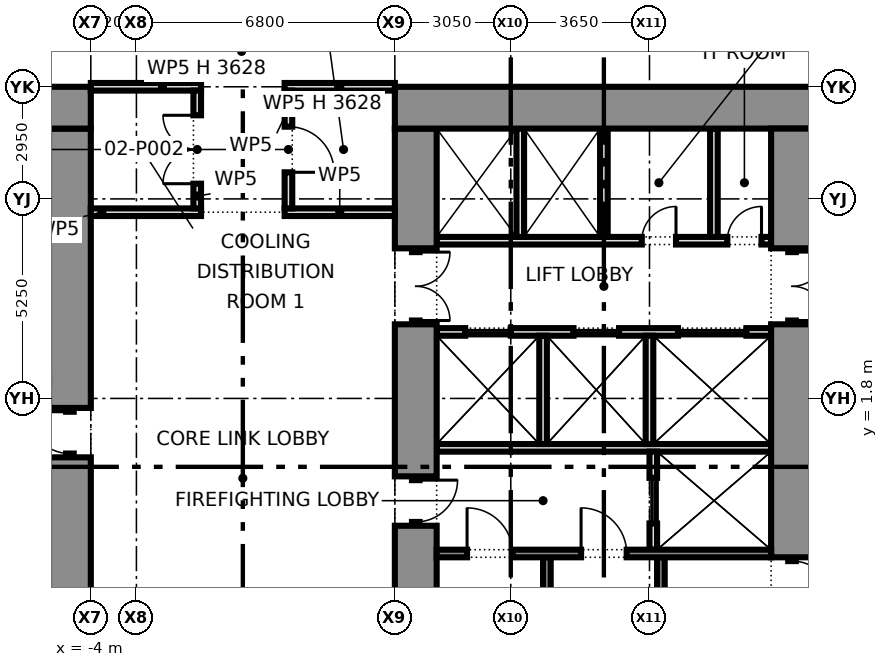
"""IFC4 building model, lengths in metres.
Left out: names, types, materials, properties, quantities, classifications, styles, units other than length and angle.
Written with IfcOpenShell. Run it as: python <this file> out.ifc"""

import sys

from ifc_helpers import new_model, si_unit, direction, frame, frame_2d, origin, place, context, subcontext, project, spatial, rectangle, extrude, element, fill, save


model = new_model("IFC4")
c1 = context("Model", 3, precision=1e-05, world=origin(), true_north=direction((0.0, 1.0)))
c2 = subcontext(c1, "Body", "Model", "MODEL_VIEW")
j1 = project(units=[si_unit("LENGTHUNIT", "METRE"), si_unit("PLANEANGLEUNIT", "RADIAN")], contexts=[c1])
p1 = place(None, origin())
s1 = spatial("IfcSite", under=j1, at=p1, CompositionType="ELEMENT")
p2 = place(p1, origin())
s2 = spatial("IfcBuilding", under=s1, at=p2, CompositionType="ELEMENT")
p3 = place(p2, frame((0.0, 0.0, 6.5)))
s3 = spatial("IfcBuildingStorey", under=s2, at=p3, CompositionType="ELEMENT", Elevation=6.5)
p4 = place(p3, frame((-15.0, 9.45, 0.0), z_axis=(0.0, 0.0, 1.0), x_axis=(1.0, 0.0, 0.0)))
e1 = element("IfcWall", 1, at=p4, inside=s3, PredefinedType="SHEAR", context=c2, shape_type="SweptSolid", body=[
    extrude(rectangle(XDim=11.0, YDim=1.1, at=frame_2d((5.5, 0.0))), origin(), (0.0, 0.0, 1.0), 4.575),
])
p5 = place(p3, frame((-4.55, -3.75, 0.0), z_axis=(0.0, 0.0, 1.0), x_axis=(0.0, 1.0, 0.0)))
e2 = element("IfcWall", 2, at=p5, inside=s3, PredefinedType="SHEAR", context=c2, shape_type="SweptSolid", body=[
    extrude(rectangle(XDim=4.0, YDim=1.1, at=frame_2d((2.0, 0.0))), origin(), (0.0, 0.0, 1.0), 4.575),
])
p6 = place(p3, frame((-4.55, 0.25, 0.0), z_axis=(0.0, 0.0, 1.0), x_axis=(0.0, 1.0, 0.0)))
e3 = element("IfcWall", 3, at=p6, inside=s3, PredefinedType="PARTITIONING", context=c2, shape_type="SweptSolid", body=[
    extrude(rectangle(XDim=1.3, YDim=0.2, at=frame_2d((0.65, 0.0))), origin(), (0.0, 0.0, 1.0), 2.4),
])
p7 = place(p6, frame((0.1, 0.0, 0.0)))
e4 = element("IfcOpeningElement", 4, at=p7, cuts=e3, PredefinedType="OPENING", context=c2, shape_type="SweptSolid", body=[
    extrude(rectangle(XDim=1.1, YDim=2.1, at=frame_2d((0.55, 1.05))), frame((0.0, 0.11, 0.0), z_axis=(0.0, -1.0, 0.0), x_axis=(1.0, 0.0, 0.0)), (0.0, 0.0, 1.0), 0.22),
])
p8 = place(p3, frame((-4.55, 1.55, 0.0), z_axis=(0.0, 0.0, 1.0), x_axis=(0.0, 1.0, 0.0)))
e5 = element("IfcWall", 5, at=p8, inside=s3, PredefinedType="SHEAR", context=c2, shape_type="SweptSolid", body=[
    extrude(rectangle(XDim=7.35, YDim=1.1, at=frame_2d((3.675, 0.0))), origin(), (0.0, 0.0, 1.0), 4.575),
])
p9 = place(p3, frame((15.0, 9.45, 0.0), z_axis=(0.0, 0.0, 1.0), x_axis=(-1.0, 0.0, 0.0)))
e6 = element("IfcWall", 6, at=p9, inside=s3, PredefinedType="SHEAR", context=c2, shape_type="SweptSolid", body=[
    extrude(rectangle(XDim=11.0, YDim=1.1, at=frame_2d((5.5, 0.0))), origin(), (0.0, 0.0, 1.0), 4.575),
])
p10 = place(p3, frame((14.45, 8.9, 0.0), z_axis=(0.0, 0.0, 1.0), x_axis=(0.0, -1.0, 0.0)))
e7 = element("IfcWall", 7, at=p10, inside=s3, PredefinedType="SHEAR", context=c2, shape_type="SweptSolid", body=[
    extrude(rectangle(XDim=3.15, YDim=1.1, at=frame_2d((1.575, 0.0))), origin(), (0.0, 0.0, 1.0), 4.575),
])
p11 = place(p3, frame((14.45, 5.75, 0.0), z_axis=(0.0, 0.0, 1.0), x_axis=(0.0, -1.0, 0.0)))
e8 = element("IfcWall", 8, at=p11, inside=s3, PredefinedType="PARTITIONING", context=c2, shape_type="SweptSolid", body=[
    extrude(rectangle(XDim=2.0, YDim=0.2, at=frame_2d((1.0, 0.0))), origin(), (0.0, 0.0, 1.0), 2.4),
])
p12 = place(p11, frame((0.1, 0.0, 0.0)))
e9 = element("IfcOpeningElement", 9, at=p12, cuts=e8, PredefinedType="OPENING", context=c2, shape_type="SweptSolid", body=[
    extrude(rectangle(XDim=1.8, YDim=2.1, at=frame_2d((0.9, 1.05))), frame((0.0, 0.11, 0.0), z_axis=(0.0, -1.0, 0.0), x_axis=(1.0, 0.0, 0.0)), (0.0, 0.0, 1.0), 0.22),
])
p13 = place(p3, frame((14.45, 3.75, 0.0), z_axis=(0.0, 0.0, 1.0), x_axis=(0.0, -1.0, 0.0)))
e10 = element("IfcWall", 10, at=p13, inside=s3, PredefinedType="SHEAR", context=c2, shape_type="SweptSolid", body=[
    extrude(rectangle(XDim=6.13, YDim=1.1, at=frame_2d((3.065, 0.0))), origin(), (0.0, 0.0, 1.0), 4.575),
])
p14 = place(p3, frame((14.45, -2.38, 0.0), z_axis=(0.0, 0.0, 1.0), x_axis=(0.0, -1.0, 0.0)))
e11 = element("IfcWall", 11, at=p14, inside=s3, PredefinedType="SHEAR", context=c2, shape_type="SweptSolid", body=[
    extrude(rectangle(XDim=1.3, YDim=0.2, at=frame_2d((0.65, 0.0))), origin(), (0.0, 0.0, 1.0), 2.4),
])
p15 = place(p14, frame((0.1, 0.0, 0.0)))
e12 = element("IfcOpeningElement", 12, at=p15, cuts=e11, PredefinedType="OPENING", context=c2, shape_type="SweptSolid", body=[
    extrude(rectangle(XDim=1.1, YDim=2.1, at=frame_2d((0.55, 1.05))), frame((0.0, 0.11, 0.0), z_axis=(0.0, -1.0, 0.0), x_axis=(1.0, 0.0, 0.0)), (0.0, 0.0, 1.0), 0.22),
])
p16 = place(p3, frame((4.55, 8.9, 0.0), z_axis=(0.0, 0.0, 1.0), x_axis=(0.0, -1.0, 0.0)))
e13 = element("IfcWall", 13, at=p16, inside=s3, PredefinedType="SHEAR", context=c2, shape_type="SweptSolid", body=[
    extrude(rectangle(XDim=3.15, YDim=1.1, at=frame_2d((1.575, 0.0))), origin(), (0.0, 0.0, 1.0), 4.575),
])
p17 = place(p3, frame((4.55, 5.75, 0.0), z_axis=(0.0, 0.0, 1.0), x_axis=(0.0, -1.0, 0.0)))
e14 = element("IfcWall", 14, at=p17, inside=s3, PredefinedType="PARTITIONING", context=c2, shape_type="SweptSolid", body=[
    extrude(rectangle(XDim=2.0, YDim=0.2, at=frame_2d((1.0, 0.0))), origin(), (0.0, 0.0, 1.0), 2.4),
])
p18 = place(p17, frame((0.1, 0.0, 0.0)))
e15 = element("IfcOpeningElement", 15, at=p18, cuts=e14, PredefinedType="OPENING", context=c2, shape_type="SweptSolid", body=[
    extrude(rectangle(XDim=1.8, YDim=2.1, at=frame_2d((0.9, 1.05))), frame((0.0, 0.11, 0.0), z_axis=(0.0, -1.0, 0.0), x_axis=(1.0, 0.0, 0.0)), (0.0, 0.0, 1.0), 0.22),
])
p19 = place(p3, frame((4.55, 3.75, 0.0), z_axis=(0.0, 0.0, 1.0), x_axis=(0.0, -1.0, 0.0)))
e16 = element("IfcWall", 16, at=p19, inside=s3, PredefinedType="SHEAR", context=c2, shape_type="SweptSolid", body=[
    extrude(rectangle(XDim=4.0, YDim=1.1, at=frame_2d((2.0, 0.0))), origin(), (0.0, 0.0, 1.0), 4.575),
])
p20 = place(p3, frame((4.55, -0.25, 0.0), z_axis=(0.0, 0.0, 1.0), x_axis=(0.0, -1.0, 0.0)))
e17 = element("IfcWall", 17, at=p20, inside=s3, PredefinedType="PARTITIONING", context=c2, shape_type="SweptSolid", body=[
    extrude(rectangle(XDim=1.3, YDim=0.2, at=frame_2d((0.65, 0.0))), origin(), (0.0, 0.0, 1.0), 2.4),
])
p21 = place(p20, frame((0.1, 0.0, 0.0)))
e18 = element("IfcOpeningElement", 18, at=p21, cuts=e17, PredefinedType="OPENING", context=c2, shape_type="SweptSolid", body=[
    extrude(rectangle(XDim=1.1, YDim=2.1, at=frame_2d((0.55, 1.05))), frame((0.0, 0.11, 0.0), z_axis=(0.0, -1.0, 0.0), x_axis=(1.0, 0.0, 0.0)), (0.0, 0.0, 1.0), 0.22),
])
p22 = place(p3, frame((4.55, -1.55, 0.0), z_axis=(0.0, 0.0, 1.0), x_axis=(0.0, -1.0, 0.0)))
e19 = element("IfcWall", 19, at=p22, inside=s3, PredefinedType="SHEAR", context=c2, shape_type="SweptSolid", body=[
    extrude(rectangle(XDim=7.35, YDim=1.1, at=frame_2d((3.675, 0.0))), origin(), (0.0, 0.0, 1.0), 4.575),
])
p23 = place(p3, frame((13.9, 5.95, 0.0), z_axis=(0.0, 0.0, 1.0), x_axis=(-1.0, 0.0, 0.0)))
e20 = element("IfcWall", 20, at=p23, inside=s3, PredefinedType="PARTITIONING", context=c2, shape_type="SweptSolid", body=[
    extrude(rectangle(XDim=8.8, YDim=0.2, at=frame_2d((4.4, 0.0))), origin(), (0.0, 0.0, 1.0), 4.575),
])
p24 = place(p23, frame((0.252, 0.0, 0.0)))
e21 = element("IfcOpeningElement", 21, at=p24, cuts=e20, PredefinedType="OPENING", context=c2, shape_type="SweptSolid", body=[
    extrude(rectangle(XDim=0.9, YDim=2.1, at=frame_2d((0.45, 1.05))), frame((0.0, 0.11, 0.0), z_axis=(0.0, -1.0, 0.0), x_axis=(1.0, 0.0, 0.0)), (0.0, 0.0, 1.0), 0.22),
])
p25 = place(p23, frame((2.502, 0.0, 0.0)))
e22 = element("IfcOpeningElement", 22, at=p25, cuts=e20, PredefinedType="OPENING", context=c2, shape_type="SweptSolid", body=[
    extrude(rectangle(XDim=0.9, YDim=2.1, at=frame_2d((0.45, 1.05))), frame((0.0, 0.11, 0.0), z_axis=(0.0, -1.0, 0.0), x_axis=(1.0, 0.0, 0.0)), (0.0, 0.0, 1.0), 0.22),
])
p26 = place(p3, frame((13.9, 3.55, 0.0), z_axis=(0.0, 0.0, 1.0), x_axis=(-1.0, 0.0, 0.0)))
e23 = element("IfcWall", 23, at=p26, inside=s3, PredefinedType="PARTITIONING", context=c2, shape_type="SweptSolid", body=[
    extrude(rectangle(XDim=8.8, YDim=0.2, at=frame_2d((4.4, 0.0))), origin(), (0.0, 0.0, 1.0), 4.575),
])
p27 = place(p26, frame((0.65, 0.0, 0.0)))
e24 = element("IfcOpeningElement", 24, at=p27, cuts=e23, PredefinedType="OPENING", context=c2, shape_type="SweptSolid", body=[
    extrude(rectangle(XDim=1.8, YDim=2.1, at=frame_2d((0.9, 1.05))), frame((0.0, 0.11, 0.0), z_axis=(0.0, -1.0, 0.0), x_axis=(1.0, 0.0, 0.0)), (0.0, 0.0, 1.0), 0.22),
])
p28 = place(p26, frame((4.0, 0.0, 0.0)))
e25 = element("IfcOpeningElement", 25, at=p28, cuts=e23, PredefinedType="OPENING", context=c2, shape_type="SweptSolid", body=[
    extrude(rectangle(XDim=1.2, YDim=2.1, at=frame_2d((0.6, 1.05))), frame((0.0, 0.11, 0.0), z_axis=(0.0, -1.0, 0.0), x_axis=(1.0, 0.0, 0.0)), (0.0, 0.0, 1.0), 0.22),
])
p29 = place(p26, frame((6.85, 0.0, 0.0)))
e26 = element("IfcOpeningElement", 26, at=p29, cuts=e23, PredefinedType="OPENING", context=c2, shape_type="SweptSolid", body=[
    extrude(rectangle(XDim=1.2, YDim=2.1, at=frame_2d((0.6, 1.05))), frame((0.0, 0.11, 0.0), z_axis=(0.0, -1.0, 0.0), x_axis=(1.0, 0.0, 0.0)), (0.0, 0.0, 1.0), 0.22),
])
p30 = place(p3, frame((13.9, 0.5, 0.0), z_axis=(0.0, 0.0, 1.0), x_axis=(-1.0, 0.0, 0.0)))
e27 = element("IfcWall", 27, at=p30, inside=s3, PredefinedType="PARTITIONING", context=c2, shape_type="SweptSolid", body=[
    extrude(rectangle(XDim=8.8, YDim=0.2, at=frame_2d((4.4, 0.0))), origin(), (0.0, 0.0, 1.0), 4.575),
])
p31 = place(p3, frame((10.8, 0.4, 0.0), z_axis=(0.0, 0.0, 1.0), x_axis=(0.0, -1.0, 0.0)))
e28 = element("IfcWall", 28, at=p31, inside=s3, PredefinedType="PARTITIONING", context=c2, shape_type="SweptSolid", body=[
    extrude(rectangle(XDim=2.58, YDim=0.2, at=frame_2d((1.29, 0.0))), origin(), (0.0, 0.0, 1.0), 4.575),
])
p32 = place(p31, frame((0.69, 0.0, 0.0)))
e29 = element("IfcOpeningElement", 29, at=p32, cuts=e28, PredefinedType="OPENING", context=c2, shape_type="SweptSolid", body=[
    extrude(rectangle(XDim=1.2, YDim=2.1, at=frame_2d((0.6, 1.05))), frame((0.0, 0.11, 0.0), z_axis=(0.0, -1.0, 0.0), x_axis=(1.0, 0.0, 0.0)), (0.0, 0.0, 1.0), 0.22),
])
p33 = place(p3, frame((13.9, -2.28, 0.0), z_axis=(0.0, 0.0, 1.0), x_axis=(-1.0, 0.0, 0.0)))
e30 = element("IfcWall", 30, at=p33, inside=s3, PredefinedType="SHEAR", context=c2, shape_type="SweptSolid", body=[
    extrude(rectangle(XDim=8.8, YDim=0.2, at=frame_2d((4.4, 0.0))), origin(), (0.0, 0.0, 1.0), 4.575),
])
p34 = place(p33, frame((3.8, 0.0, 0.0)))
e31 = element("IfcOpeningElement", 31, at=p34, cuts=e30, PredefinedType="OPENING", context=c2, shape_type="SweptSolid", body=[
    extrude(rectangle(XDim=1.2, YDim=2.1, at=frame_2d((0.6, 1.05))), frame((0.0, 0.11, 0.0), z_axis=(0.0, -1.0, 0.0), x_axis=(1.0, 0.0, 0.0)), (0.0, 0.0, 1.0), 0.22),
])
p35 = place(p33, frame((6.8, 0.0, 0.0)))
e32 = element("IfcOpeningElement", 32, at=p35, cuts=e30, PredefinedType="OPENING", context=c2, shape_type="SweptSolid", body=[
    extrude(rectangle(XDim=1.2, YDim=2.1, at=frame_2d((0.6, 1.05))), frame((0.0, 0.11, 0.0), z_axis=(0.0, -1.0, 0.0), x_axis=(1.0, 0.0, 0.0)), (0.0, 0.0, 1.0), 0.22),
])
for number, where, z_axis, x_axis in (
    (33, (11.0, -2.38, 0.0), (0.0, 0.0, 1.0), (0.0, -1.0, 0.0)),
    (34, (8.0, -2.38, 0.0), (0.0, 0.0, 1.0), (0.0, -1.0, 0.0)),
):
    element("IfcWall", number, at=place(p3, frame(where, z_axis=z_axis, x_axis=x_axis)), inside=s3, PredefinedType="SHEAR", context=c2, shape_type="SweptSolid", body=[
        extrude(rectangle(XDim=6.52, YDim=0.2, at=frame_2d((3.26, 0.0))), origin(), (0.0, 0.0, 1.0), 4.575),
    ])
for number, where, z_axis, x_axis in (
    (35, (9.5, 8.9, 0.0), (0.0, 0.0, 1.0), (0.0, -1.0, 0.0)),
    (36, (7.3, 8.9, 0.0), (0.0, 0.0, 1.0), (0.0, -1.0, 0.0)),
    (37, (12.395, 8.9, 0.0), (0.0, 0.0, 1.0), (0.0, -1.0, 0.0)),
    (38, (10.7, 3.45, 0.0), (0.0, 0.0, 1.0), (0.0, -1.0, 0.0)),
    (39, (7.9, 3.45, 0.0), (0.0, 0.0, 1.0), (0.0, -1.0, 0.0)),
):
    element("IfcWall", number, at=place(p3, frame(where, z_axis=z_axis, x_axis=x_axis)), inside=s3, PredefinedType="PARTITIONING", context=c2, shape_type="SweptSolid", body=[
        extrude(rectangle(XDim=2.85, YDim=0.2, at=frame_2d((1.425, 0.0))), origin(), (0.0, 0.0, 1.0), 4.575),
    ])
for number, where, z_axis, x_axis in (
    (40, (-4.0, 6.7, 0.0), (0.0, 0.0, 1.0), (1.0, 0.0, 0.0)),
    (41, (1.1, 6.7, 0.0), (0.0, 0.0, 1.0), (1.0, 0.0, 0.0)),
):
    element("IfcWall", number, at=place(p3, frame(where, z_axis=z_axis, x_axis=x_axis)), inside=s3, PredefinedType="PARTITIONING", context=c2, shape_type="SweptSolid", body=[
        extrude(rectangle(XDim=2.9, YDim=0.2, at=frame_2d((1.45, 0.0))), origin(), (0.0, 0.0, 1.0), 4.575),
    ])
for number, where, z_axis, x_axis in (
    (42, (-4.0, 10.0, 0.0), (0.0, 0.0, 1.0), (1.0, 0.0, 0.0)),
    (43, (1.1, 10.0, 0.0), (0.0, 0.0, 1.0), (1.0, 0.0, 0.0)),
):
    element("IfcWall", number, at=place(p3, frame(where, z_axis=z_axis, x_axis=x_axis)), inside=s3, PredefinedType="PARTITIONING", context=c2, shape_type="SweptSolid", body=[
        extrude(rectangle(XDim=2.9, YDim=0.2, at=frame_2d((1.45, 0.0))), origin(), (0.0, 0.0, 1.0), 3.628),
    ])
p36 = place(p3, frame((1.2, 6.8, 0.0), z_axis=(0.0, 0.0, 1.0), x_axis=(0.0, 1.0, 0.0)))
e44 = element("IfcWall", 44, at=p36, inside=s3, PredefinedType="PARTITIONING", context=c2, shape_type="SweptSolid", body=[
    extrude(rectangle(XDim=3.1, YDim=0.2, at=frame_2d((1.55, 0.0))), origin(), (0.0, 0.0, 1.0), 4.575),
])
p37 = place(p36, frame((0.95, 0.0, 0.0)))
e45 = element("IfcOpeningElement", 45, at=p37, cuts=e44, PredefinedType="OPENING", context=c2, shape_type="SweptSolid", body=[
    extrude(rectangle(XDim=1.2, YDim=2.1, at=frame_2d((0.6, 1.05))), frame((0.0, 0.11, 0.0), z_axis=(0.0, -1.0, 0.0), x_axis=(1.0, 0.0, 0.0)), (0.0, 0.0, 1.0), 0.22),
])
p38 = place(p3, frame((-1.2, 6.8, 0.0), z_axis=(0.0, 0.0, 1.0), x_axis=(0.0, 1.0, 0.0)))
e46 = element("IfcWall", 46, at=p38, inside=s3, PredefinedType="PARTITIONING", context=c2, shape_type="SweptSolid", body=[
    extrude(rectangle(XDim=3.1, YDim=0.2, at=frame_2d((1.55, 0.0))), origin(), (0.0, 0.0, 1.0), 4.575),
])
p39 = place(p38, frame((0.65, 0.0, 0.0)))
e47 = element("IfcOpeningElement", 47, at=p39, cuts=e46, PredefinedType="OPENING", context=c2, shape_type="SweptSolid", body=[
    extrude(rectangle(XDim=1.8, YDim=2.1, at=frame_2d((0.9, 1.05))), frame((0.0, 0.11, 0.0), z_axis=(0.0, -1.0, 0.0), x_axis=(1.0, 0.0, 0.0)), (0.0, 0.0, 1.0), 0.22),
])
p40 = place(p7, origin())
e48 = element("IfcDoor", 48, at=p40, inside=s3, OperationType="SINGLE_SWING_RIGHT", PredefinedType="DOOR", context=c2, shape_type="SweptSolid", body=[
    extrude(rectangle(XDim=1.1, YDim=2.1, at=frame_2d((0.55, 1.05))), frame((0.0, 0.025, 0.0), z_axis=(0.0, -1.0, 0.0), x_axis=(1.0, 0.0, 0.0)), (0.0, 0.0, 1.0), 0.05),
])
fill(e4, e48)
p41 = place(p12, origin())
e49 = element("IfcDoor", 49, at=p41, inside=s3, OperationType="DOUBLE_DOOR_SINGLE_SWING", PredefinedType="DOOR", context=c2, shape_type="SweptSolid", body=[
    extrude(rectangle(XDim=1.8, YDim=2.1, at=frame_2d((0.9, 1.05))), frame((0.0, 0.025, 0.0), z_axis=(0.0, -1.0, 0.0), x_axis=(1.0, 0.0, 0.0)), (0.0, 0.0, 1.0), 0.05),
])
fill(e9, e49)
p42 = place(p15, origin())
e50 = element("IfcDoor", 50, at=p42, inside=s3, OperationType="SINGLE_SWING_RIGHT", PredefinedType="DOOR", context=c2, shape_type="SweptSolid", body=[
    extrude(rectangle(XDim=1.1, YDim=2.1, at=frame_2d((0.55, 1.05))), frame((0.0, 0.025, 0.0), z_axis=(0.0, -1.0, 0.0), x_axis=(1.0, 0.0, 0.0)), (0.0, 0.0, 1.0), 0.05),
])
fill(e12, e50)
p43 = place(p18, origin())
e51 = element("IfcDoor", 51, at=p43, inside=s3, OperationType="DOUBLE_DOOR_SINGLE_SWING", PredefinedType="DOOR", context=c2, shape_type="SweptSolid", body=[
    extrude(rectangle(XDim=1.8, YDim=2.1, at=frame_2d((0.9, 1.05))), frame((0.0, 0.025, 0.0), z_axis=(0.0, -1.0, 0.0), x_axis=(1.0, 0.0, 0.0)), (0.0, 0.0, 1.0), 0.05),
])
fill(e15, e51)
p44 = place(p21, origin())
e52 = element("IfcDoor", 52, at=p44, inside=s3, OperationType="SINGLE_SWING_LEFT", PredefinedType="DOOR", context=c2, shape_type="SweptSolid", body=[
    extrude(rectangle(XDim=1.1, YDim=2.1, at=frame_2d((0.55, 1.05))), frame((0.0, 0.025, 0.0), z_axis=(0.0, -1.0, 0.0), x_axis=(1.0, 0.0, 0.0)), (0.0, 0.0, 1.0), 0.05),
])
fill(e18, e52)
p45 = place(p27, origin())
e53 = element("IfcDoor", 53, at=p45, inside=s3, OperationType="DOUBLE_DOOR_SLIDING", PredefinedType="DOOR", context=c2, shape_type="SweptSolid", body=[
    extrude(rectangle(XDim=1.8, YDim=2.1, at=frame_2d((0.9, 1.05))), frame((0.0, 0.025, 0.0), z_axis=(0.0, -1.0, 0.0), x_axis=(1.0, 0.0, 0.0)), (0.0, 0.0, 1.0), 0.05),
])
fill(e24, e53)
p46 = place(p28, origin())
e54 = element("IfcDoor", 54, at=p46, inside=s3, OperationType="DOUBLE_DOOR_SLIDING", PredefinedType="DOOR", context=c2, shape_type="SweptSolid", body=[
    extrude(rectangle(XDim=1.2, YDim=2.1, at=frame_2d((0.6, 1.05))), frame((0.0, 0.025, 0.0), z_axis=(0.0, -1.0, 0.0), x_axis=(1.0, 0.0, 0.0)), (0.0, 0.0, 1.0), 0.05),
])
fill(e25, e54)
p47 = place(p29, origin())
e55 = element("IfcDoor", 55, at=p47, inside=s3, OperationType="DOUBLE_DOOR_SLIDING", PredefinedType="DOOR", context=c2, shape_type="SweptSolid", body=[
    extrude(rectangle(XDim=1.2, YDim=2.1, at=frame_2d((0.6, 1.05))), frame((0.0, 0.025, 0.0), z_axis=(0.0, -1.0, 0.0), x_axis=(1.0, 0.0, 0.0)), (0.0, 0.0, 1.0), 0.05),
])
fill(e26, e55)
p48 = place(p32, origin())
e56 = element("IfcDoor", 56, at=p48, inside=s3, OperationType="DOUBLE_DOOR_SLIDING", PredefinedType="DOOR", context=c2, shape_type="SweptSolid", body=[
    extrude(rectangle(XDim=1.2, YDim=2.1, at=frame_2d((0.6, 1.05))), frame((0.0, 0.025, 0.0), z_axis=(0.0, -1.0, 0.0), x_axis=(1.0, 0.0, 0.0)), (0.0, 0.0, 1.0), 0.05),
])
fill(e29, e56)
p49 = place(p24, frame((0.9, 0.0, 0.0), z_axis=(0.0, 0.0, 1.0), x_axis=(-1.0, 0.0, 0.0)))
e57 = element("IfcDoor", 57, at=p49, inside=s3, OperationType="SINGLE_SWING_RIGHT", PredefinedType="DOOR", context=c2, shape_type="SweptSolid", body=[
    extrude(rectangle(XDim=0.9, YDim=2.1, at=frame_2d((0.45, 1.05))), frame((0.0, 0.025, 0.0), z_axis=(0.0, -1.0, 0.0), x_axis=(1.0, 0.0, 0.0)), (0.0, 0.0, 1.0), 0.05),
])
fill(e21, e57)
p50 = place(p25, frame((0.9, 0.0, 0.0), z_axis=(0.0, 0.0, 1.0), x_axis=(-1.0, 0.0, 0.0)))
e58 = element("IfcDoor", 58, at=p50, inside=s3, OperationType="SINGLE_SWING_RIGHT", PredefinedType="DOOR", context=c2, shape_type="SweptSolid", body=[
    extrude(rectangle(XDim=0.9, YDim=2.1, at=frame_2d((0.45, 1.05))), frame((0.0, 0.025, 0.0), z_axis=(0.0, -1.0, 0.0), x_axis=(1.0, 0.0, 0.0)), (0.0, 0.0, 1.0), 0.05),
])
fill(e22, e58)
p51 = place(p34, frame((1.2, 0.0, 0.0), z_axis=(0.0, 0.0, 1.0), x_axis=(-1.0, 0.0, 0.0)))
e59 = element("IfcDoor", 59, at=p51, inside=s3, OperationType="SINGLE_SWING_LEFT", PredefinedType="DOOR", context=c2, shape_type="SweptSolid", body=[
    extrude(rectangle(XDim=1.2, YDim=2.1, at=frame_2d((0.6, 1.05))), frame((0.0, 0.025, 0.0), z_axis=(0.0, -1.0, 0.0), x_axis=(1.0, 0.0, 0.0)), (0.0, 0.0, 1.0), 0.05),
])
fill(e31, e59)
p52 = place(p35, frame((1.2, 0.0, 0.0), z_axis=(0.0, 0.0, 1.0), x_axis=(-1.0, 0.0, 0.0)))
e60 = element("IfcDoor", 60, at=p52, inside=s3, OperationType="SINGLE_SWING_LEFT", PredefinedType="DOOR", context=c2, shape_type="SweptSolid", body=[
    extrude(rectangle(XDim=1.2, YDim=2.1, at=frame_2d((0.6, 1.05))), frame((0.0, 0.025, 0.0), z_axis=(0.0, -1.0, 0.0), x_axis=(1.0, 0.0, 0.0)), (0.0, 0.0, 1.0), 0.05),
])
fill(e32, e60)
p53 = place(p39, origin())
e61 = element("IfcDoor", 61, at=p53, inside=s3, OperationType="DOUBLE_DOOR_SINGLE_SWING", PredefinedType="DOOR", context=c2, shape_type="SweptSolid", body=[
    extrude(rectangle(XDim=1.8, YDim=2.1, at=frame_2d((0.9, 1.05))), frame((0.0, 0.025, 0.0), z_axis=(0.0, -1.0, 0.0), x_axis=(1.0, 0.0, 0.0)), (0.0, 0.0, 1.0), 0.05),
])
fill(e47, e61)
p54 = place(p37, frame((1.2, 0.0, 0.0), z_axis=(0.0, 0.0, 1.0), x_axis=(-1.0, 0.0, 0.0)))
e62 = element("IfcDoor", 62, at=p54, inside=s3, OperationType="SINGLE_SWING_RIGHT", PredefinedType="DOOR", context=c2, shape_type="SweptSolid", body=[
    extrude(rectangle(XDim=1.2, YDim=2.1, at=frame_2d((0.6, 1.05))), frame((0.0, 0.025, 0.0), z_axis=(0.0, -1.0, 0.0), x_axis=(1.0, 0.0, 0.0)), (0.0, 0.0, 1.0), 0.05),
])
fill(e45, e62)
save(model, sys.argv[1])
